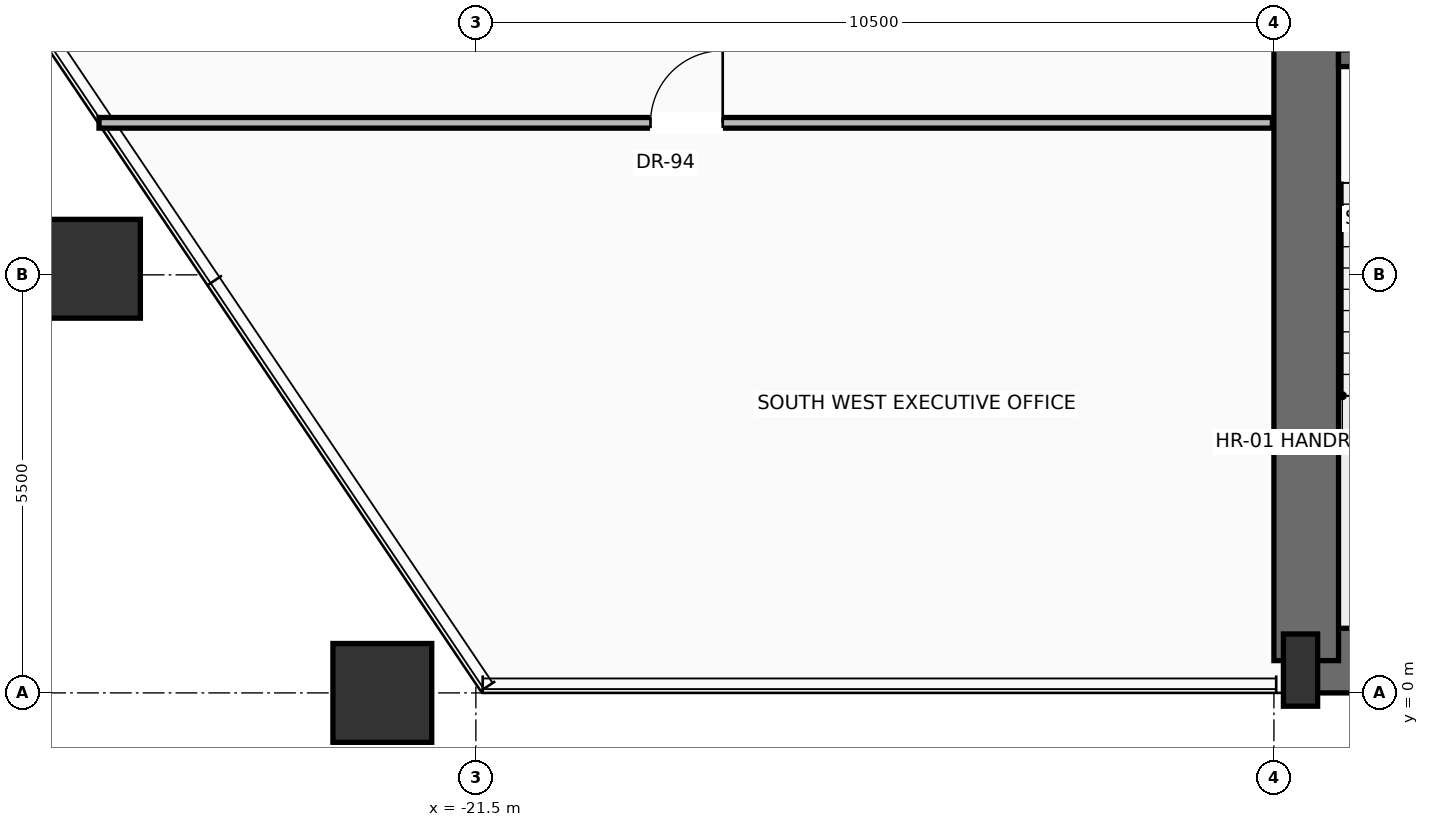
"""IFC4 building model, lengths in metres.
Left out: names, types, materials, properties, quantities, classifications, styles, units other than length and angle.
Written with IfcOpenShell. Run it as: python <this file> out.ifc"""

import sys

from ifc_helpers import new_model, si_unit, direction, frame, frame_2d, origin, origin_2d, place, context, subcontext, project, spatial, rectangle, hollow_rectangle, extrude, source, transform, mapped, element, fill, save


model = new_model("IFC4")
c1 = context("Model", 3, precision=1e-05, world=origin(), true_north=direction((0.0, 1.0)))
c2 = subcontext(c1, "Body", "Model", "MODEL_VIEW")
j1 = project(units=[si_unit("LENGTHUNIT", "METRE"), si_unit("PLANEANGLEUNIT", "RADIAN")], contexts=[c1])
p1 = place(None, origin())
s1 = spatial("IfcSite", under=j1, at=p1, CompositionType="ELEMENT")
p2 = place(p1, origin())
s2 = spatial("IfcBuilding", under=s1, at=p2, CompositionType="ELEMENT")
p3 = place(p2, frame((0.0, 0.0, 42.3)))
s3 = spatial("IfcBuildingStorey", under=s2, at=p3, CompositionType="ELEMENT", Elevation=42.3)
p4 = place(p3, frame((-10.65, 0.425, 0.0), z_axis=(0.0, 0.0, 1.0), x_axis=(1.0, 0.0, 0.0)))
e1 = element("IfcWall", 1, at=p4, inside=s3, PredefinedType="SHEAR", context=c2, shape_type="SweptSolid", body=[
    extrude(rectangle(XDim=21.3, YDim=0.85, at=frame_2d((10.65, 0.0))), origin(), (0.0, 0.0, 1.0), 3.45),
])
p5 = place(p3, frame((-10.575, 0.425, 0.0), z_axis=(0.0, 0.0, 1.0), x_axis=(0.0, 1.0, 0.0)))
e2 = element("IfcWall", 2, at=p5, inside=s3, PredefinedType="SHEAR", context=c2, shape_type="SweptSolid", body=[
    extrude(rectangle(XDim=15.75, YDim=0.85, at=frame_2d((7.875, 0.0))), origin(), (0.0, 0.0, 1.0), 3.45),
])
m1 = source(origin(), c2, "Body", "SweptSolid", [
    extrude(rectangle(XDim=0.45, YDim=0.95, at=origin_2d()), origin(), (0.0, 0.0, 1.0), 3.7),
])
p6 = place(p3, frame((-10.65, 0.3, 0.0), z_axis=(0.0, 0.0, 1.0), x_axis=(1.0, 0.0, 0.0)))
e3 = element("IfcColumn", 3, at=p6, inside=s3, PredefinedType="PILASTER", context=c2, shape_type="MappedRepresentation", body=[
    mapped(m1, transform((0.0, 0.0, 0.0), scale=1.0)),
])
m2 = source(origin(), c2, "Body", "SweptSolid", [
    extrude(hollow_rectangle(XDim=1.3, YDim=1.3, WallThickness=0.065, at=origin_2d()), origin(), (0.0, 0.0, 1.0), 3.692),
])
p7 = place(p3, frame((-22.731, 0.0, 0.004), z_axis=(-0.018582676032, 0.0, 0.999827327168), x_axis=(0.0, -1.0, 0.0)))
e4 = element("IfcColumn", 4, at=p7, inside=s3, PredefinedType="COLUMN", context=c2, shape_type="MappedRepresentation", body=[
    mapped(m2, transform((0.0, 0.0, 0.0), scale=1.0)),
])
m3 = source(origin(), c2, "Body", "SweptSolid", [
    extrude(hollow_rectangle(XDim=1.3, YDim=1.3, WallThickness=0.065, at=origin_2d()), origin(), (0.0, 0.0, 1.0), 3.692),
])
p8 = place(p3, frame((-26.564, 5.58, 0.004), z_axis=(-0.003306559511, -0.017723158979, 0.999837464941), x_axis=(0.983037888174, -0.183402591077, 0.0)))
e5 = element("IfcColumn", 5, at=p8, inside=s3, PredefinedType="COLUMN", context=c2, shape_type="MappedRepresentation", body=[
    mapped(m3, transform((0.0, 0.0, 0.0), scale=1.0)),
])
p9 = place(p3, frame((-5.5, 8.35, 0.0), z_axis=(0.0, 0.0, 1.0), x_axis=(-1.0, 0.0, 0.0)))
e6 = element("IfcWall", 6, at=p9, inside=s3, PredefinedType="SOLIDWALL", context=c2, shape_type="SweptSolid", body=[
    extrude(rectangle(XDim=4.65, YDim=0.22, at=frame_2d((2.325, 0.0))), origin(), (0.0, 0.0, 1.0), 3.45),
])
p10 = place(p9, frame((2.5, 0.0, 0.0)))
e7 = element("IfcOpeningElement", 7, at=p10, cuts=e6, PredefinedType="OPENING", context=c2, shape_type="SweptSolid", body=[
    extrude(rectangle(XDim=1.15, YDim=2.2, at=frame_2d((0.575, 1.1))), frame((0.0, 0.12, 0.0), z_axis=(0.0, -1.0, 0.0), x_axis=(1.0, 0.0, 0.0)), (0.0, 0.0, 1.0), 0.24),
])
p11 = place(p3, frame((-26.458, 7.5, 0.0), z_axis=(0.0, 0.0, 1.0), x_axis=(1.0, 0.0, 0.0)))
e8 = element("IfcWall", 8, at=p11, inside=s3, PredefinedType="PARTITIONING", context=c2, shape_type="SweptSolid", body=[
    extrude(rectangle(XDim=15.438, YDim=0.14, at=frame_2d((7.719, 0.0))), origin(), (0.0, 0.0, 1.0), 2.979),
])
p12 = place(p11, frame((7.256, 0.0, 0.0)))
e9 = element("IfcOpeningElement", 9, at=p12, cuts=e8, PredefinedType="OPENING", context=c2, shape_type="SweptSolid", body=[
    extrude(rectangle(XDim=0.95, YDim=2.2, at=frame_2d((0.475, 1.1))), frame((0.0, 0.08, 0.0), z_axis=(0.0, -1.0, 0.0), x_axis=(1.0, 0.0, 0.0)), (0.0, 0.0, 1.0), 0.16),
])
m4 = source(origin(), c2, "Body", "SweptSolid", [
    extrude(rectangle(XDim=0.95, YDim=2.2, at=frame_2d((0.475, 1.1))), frame((0.0, 0.025, 0.0), z_axis=(0.0, -1.0, 0.0), x_axis=(1.0, 0.0, 0.0)), (0.0, 0.0, 1.0), 0.05),
])
p13 = place(p12, origin())
e10 = element("IfcDoor", 10, at=p13, inside=s3, OperationType="SINGLE_SWING_RIGHT", PredefinedType="DOOR", context=c2, shape_type="MappedRepresentation", body=[
    mapped(m4, transform((0.0, 0.0, 0.0), scale=1.0)),
])
fill(e9, e10)
save(model, sys.argv[1])
